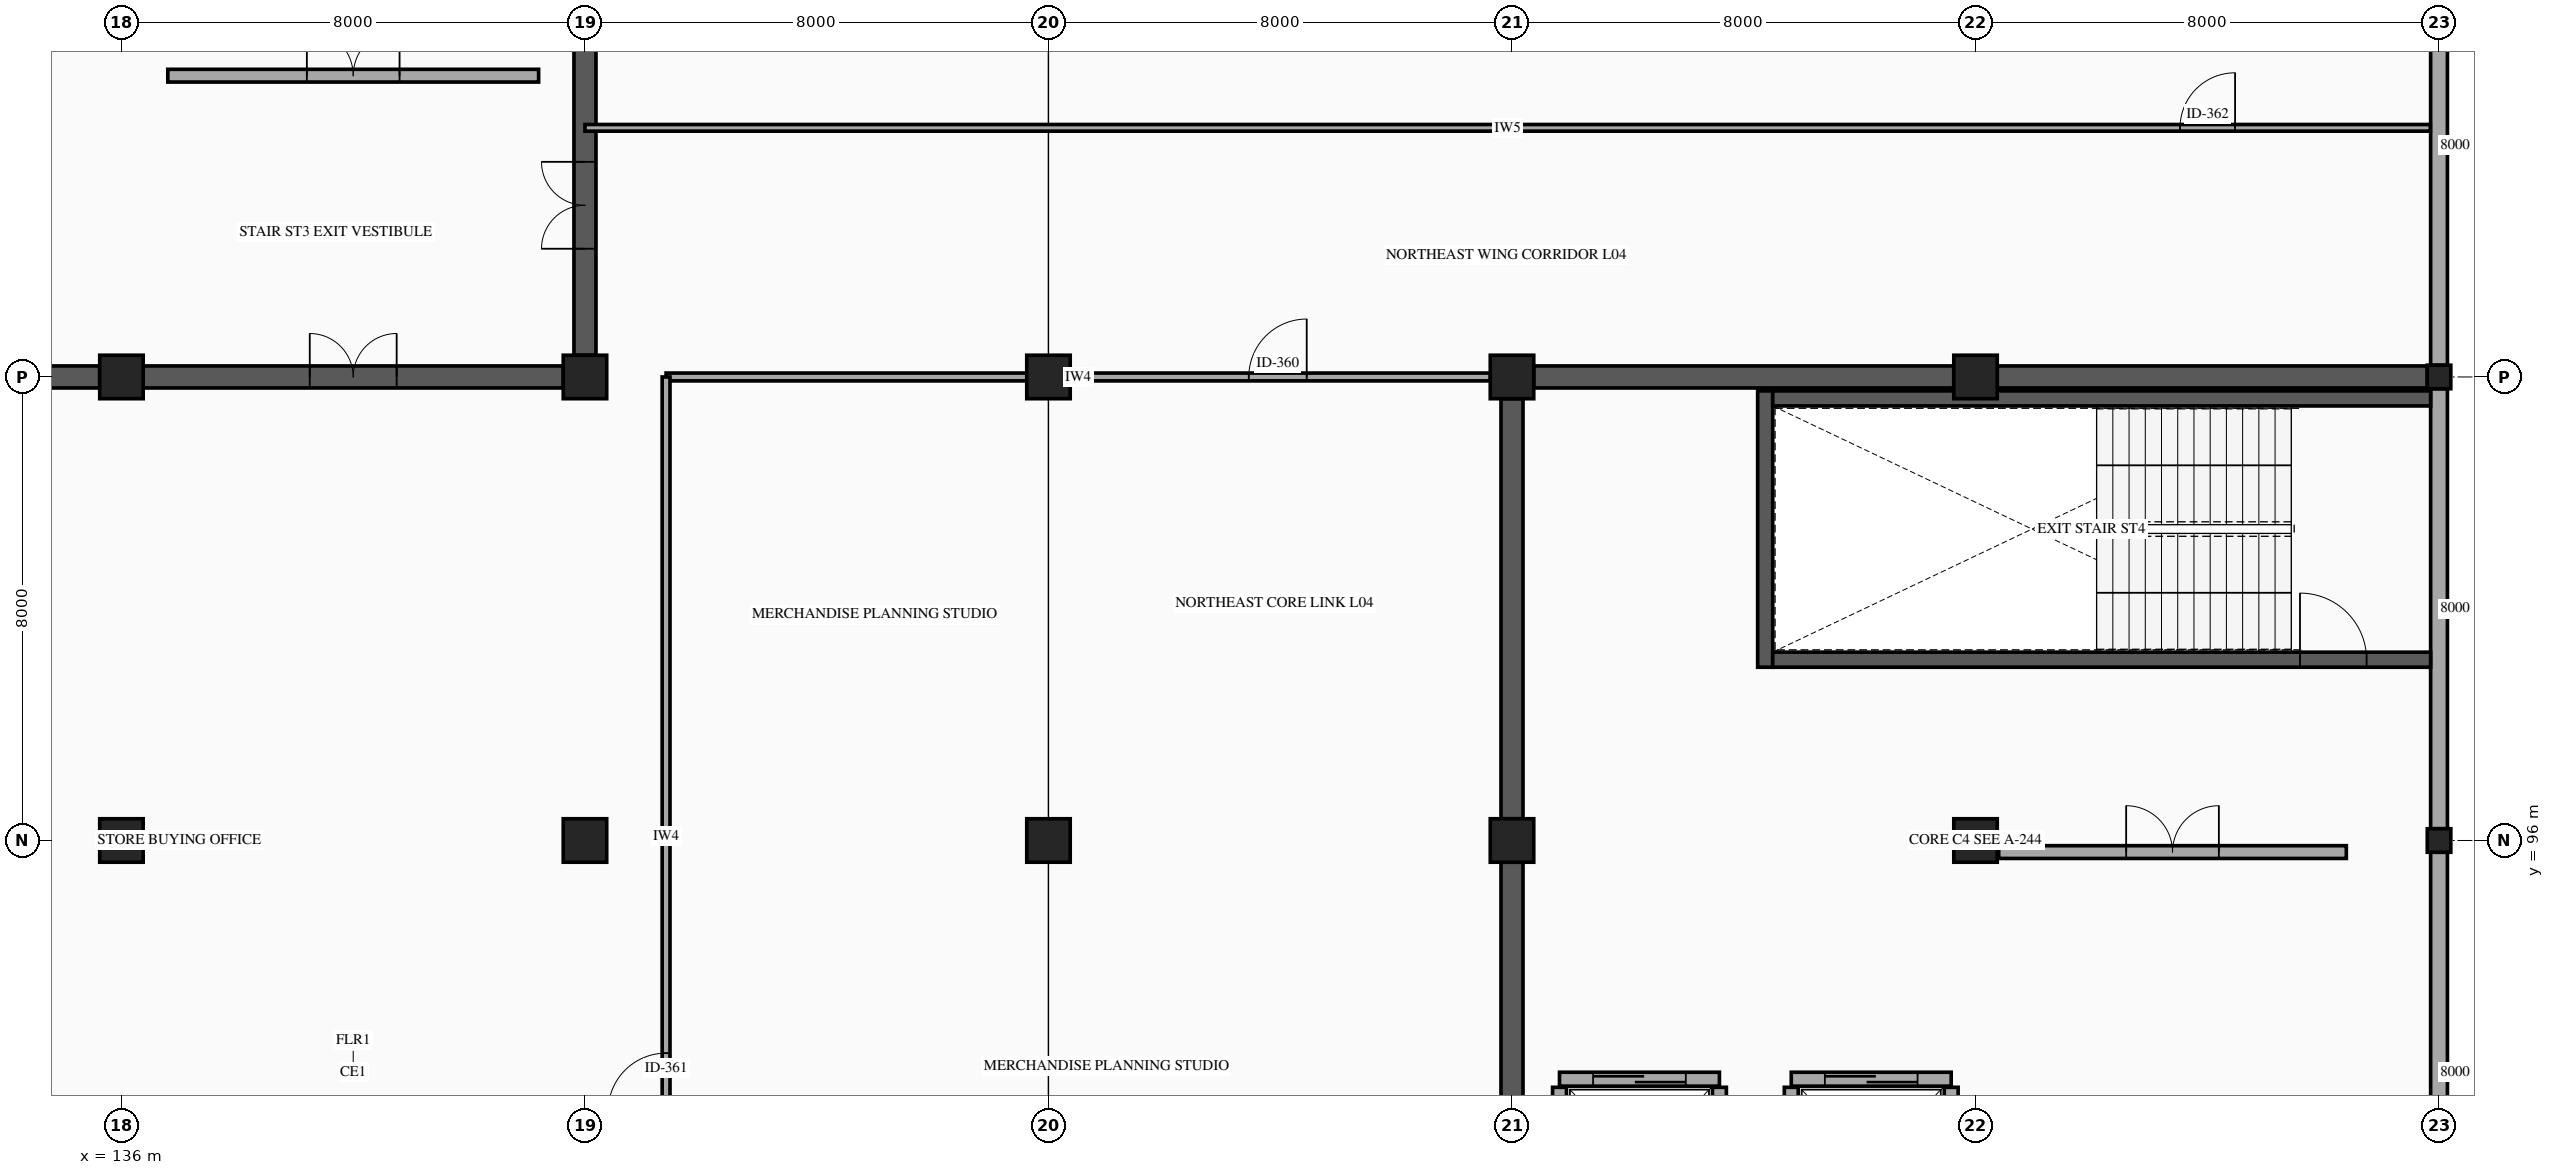
"""IFC4 building model, lengths in metres.
Left out: names, types, materials, properties, quantities, classifications, styles, units other than length and angle.
Written with IfcOpenShell. Run it as: python <this file> out.ifc"""

import sys

from ifc_helpers import new_model, si_unit, direction, frame, frame_2d, origin, origin_2d, place, context, subcontext, project, spatial, rectangle, hollow_rectangle, extrude, element, fill, save


model = new_model("IFC4")
c1 = context("Model", 3, precision=1e-05, world=origin(), true_north=direction((0.0, 1.0)))
c2 = subcontext(c1, "Body", "Model", "MODEL_VIEW")
j1 = project(units=[si_unit("LENGTHUNIT", "METRE"), si_unit("PLANEANGLEUNIT", "RADIAN")], contexts=[c1])
p1 = place(None, origin())
s1 = spatial("IfcSite", under=j1, at=p1, CompositionType="ELEMENT")
p2 = place(p1, origin())
s2 = spatial("IfcBuilding", under=s1, at=p2, CompositionType="ELEMENT")
p3 = place(p2, frame((0.0, 0.0, 19.4)))
s3 = spatial("IfcBuildingStorey", under=s2, at=p3, CompositionType="ELEMENT", Elevation=19.4)
for number, where, z_axis, x_axis in (
    (1, (136.0, 96.0, 0.0), (0.0, 0.0, 1.0), (1.0, 0.0, 0.0)),
    (2, (136.0, 104.0, 0.0), (0.0, 0.0, 1.0), (1.0, 0.0, 0.0)),
    (3, (144.0, 96.0, 0.0), (0.0, 0.0, 1.0), (1.0, 0.0, 0.0)),
    (4, (144.0, 104.0, 0.0), (0.0, 0.0, 1.0), (1.0, 0.0, 0.0)),
    (5, (152.0, 96.0, 0.0), (0.0, 0.0, 1.0), (1.0, 0.0, 0.0)),
    (6, (152.0, 104.0, 0.0), (0.0, 0.0, 1.0), (1.0, 0.0, 0.0)),
    (7, (160.0, 96.0, 0.0), (0.0, 0.0, 1.0), (1.0, 0.0, 0.0)),
    (8, (160.0, 104.0, 0.0), (0.0, 0.0, 1.0), (1.0, 0.0, 0.0)),
    (9, (168.0, 96.0, 0.0), (0.0, 0.0, 1.0), (1.0, 0.0, 0.0)),
    (10, (168.0, 104.0, 0.0), (0.0, 0.0, 1.0), (1.0, 0.0, 0.0)),
):
    element("IfcColumn", number, at=place(p3, frame(where, z_axis=z_axis, x_axis=x_axis)), inside=s3, PredefinedType="COLUMN", context=c2, shape_type="SweptSolid", body=[
        extrude(rectangle(XDim=0.75, YDim=0.75, at=origin_2d()), origin(), (0.0, 0.0, 1.0), 4.5),
    ])
for number, where, z_axis, x_axis in (
    (11, (176.0, 96.0, 0.0), (0.0, 0.0, 1.0), (1.0, 0.0, 0.0)),
    (12, (176.0, 104.0, 0.0), (0.0, 0.0, 1.0), (1.0, 0.0, 0.0)),
):
    element("IfcColumn", number, at=place(p3, frame(where, z_axis=z_axis, x_axis=x_axis)), inside=s3, PredefinedType="COLUMN", context=c2, shape_type="SweptSolid", body=[
        extrude(hollow_rectangle(XDim=0.406, YDim=0.406, WallThickness=0.015, InnerFilletRadius=0.015, OuterFilletRadius=0.029, at=origin_2d()), origin(), (0.0, 0.0, 1.0), 4.5),
    ])
for number, where, z_axis, x_axis in (
    (13, (176.0, 111.797, 0.0), (0.0, 0.0, 1.0), (0.0, -1.0, 0.0)),
    (14, (176.0, 103.797, 0.0), (0.0, 0.0, 1.0), (0.0, -1.0, 0.0)),
    (15, (176.0, 95.797, 0.0), (0.0, 0.0, 1.0), (0.0, -1.0, 0.0)),
):
    element("IfcWall", number, at=place(p3, frame(where, z_axis=z_axis, x_axis=x_axis)), inside=s3, PredefinedType="STANDARD", context=c2, shape_type="SweptSolid", body=[
        extrude(rectangle(XDim=7.594, YDim=0.29, at=frame_2d((3.797, 0.0))), origin(), (0.0, 0.0, 1.0), 3.48),
    ])
p4 = place(p3, frame((128.375, 104.0, 0.0), z_axis=(0.0, 0.0, 1.0), x_axis=(1.0, 0.0, 0.0)))
e16 = element("IfcWall", 16, at=p4, inside=s3, PredefinedType="SHEAR", context=c2, shape_type="SweptSolid", body=[
    extrude(rectangle(XDim=7.25, YDim=0.38, at=frame_2d((3.625, 0.0))), origin(), (0.0, 0.0, 1.0), 4.28),
])
p5 = place(p3, frame((136.375, 104.0, 0.0), z_axis=(0.0, 0.0, 1.0), x_axis=(1.0, 0.0, 0.0)))
e17 = element("IfcWall", 17, at=p5, inside=s3, PredefinedType="SHEAR", context=c2, shape_type="SweptSolid", body=[
    extrude(rectangle(XDim=7.25, YDim=0.38, at=frame_2d((3.625, 0.0))), origin(), (0.0, 0.0, 1.0), 4.28),
])
p6 = place(p5, frame((2.875, 0.0, 0.0)))
e18 = element("IfcOpeningElement", 18, at=p6, cuts=e17, PredefinedType="OPENING", context=c2, shape_type="SweptSolid", body=[
    extrude(rectangle(XDim=1.5, YDim=2.15, at=frame_2d((0.75, 1.075))), frame((0.0, 0.2, 0.0), z_axis=(0.0, -1.0, 0.0), x_axis=(1.0, 0.0, 0.0)), (0.0, 0.0, 1.0), 0.4),
])
p7 = place(p3, frame((144.0, 104.375, 0.0), z_axis=(0.0, 0.0, 1.0), x_axis=(0.0, 1.0, 0.0)))
e19 = element("IfcWall", 19, at=p7, inside=s3, PredefinedType="SHEAR", context=c2, shape_type="SweptSolid", body=[
    extrude(rectangle(XDim=7.25, YDim=0.38, at=frame_2d((3.625, 0.0))), origin(), (0.0, 0.0, 1.0), 4.28),
])
p8 = place(p7, frame((1.838, 0.0, 0.0)))
e20 = element("IfcOpeningElement", 20, at=p8, cuts=e19, PredefinedType="OPENING", context=c2, shape_type="SweptSolid", body=[
    extrude(rectangle(XDim=1.5, YDim=2.15, at=frame_2d((0.75, 1.075))), frame((0.0, 0.2, 0.0), z_axis=(0.0, -1.0, 0.0), x_axis=(1.0, 0.0, 0.0)), (0.0, 0.0, 1.0), 0.4),
])
p9 = place(p3, frame((136.8, 109.2, 0.0), z_axis=(0.0, 0.0, 1.0), x_axis=(1.0, 0.0, 0.0)))
e21 = element("IfcWall", 21, at=p9, inside=s3, PredefinedType="PARTITIONING", context=c2, shape_type="SweptSolid", body=[
    extrude(rectangle(XDim=6.4, YDim=0.22, at=frame_2d((3.2, 0.0))), origin(), (0.0, 0.0, 1.0), 3.48),
])
p10 = place(p9, frame((2.4, 0.0, 0.0)))
e22 = element("IfcOpeningElement", 22, at=p10, cuts=e21, PredefinedType="OPENING", context=c2, shape_type="SweptSolid", body=[
    extrude(rectangle(XDim=1.6, YDim=2.15, at=frame_2d((0.8, 1.075))), frame((0.0, 0.12, 0.0), z_axis=(0.0, -1.0, 0.0), x_axis=(1.0, 0.0, 0.0)), (0.0, 0.0, 1.0), 0.24),
])
p11 = place(p3, frame((164.37, 98.99, 0.0), z_axis=(0.0, 0.0, 1.0), x_axis=(0.0, 1.0, 0.0)))
e23 = element("IfcWall", 23, at=p11, inside=s3, PredefinedType="SHEAR", context=c2, shape_type="SweptSolid", body=[
    extrude(rectangle(XDim=4.77, YDim=0.26, at=frame_2d((2.385, 0.0))), origin(), (0.0, 0.0, 1.0), 4.28),
])
p12 = place(p3, frame((164.5, 99.12, 0.0), z_axis=(0.0, 0.0, 1.0), x_axis=(1.0, 0.0, 0.0)))
e24 = element("IfcWall", 24, at=p12, inside=s3, PredefinedType="SHEAR", context=c2, shape_type="SweptSolid", body=[
    extrude(rectangle(XDim=11.355, YDim=0.26, at=frame_2d((5.677, 0.0))), origin(), (0.0, 0.0, 1.0), 4.28),
])
p13 = place(p12, frame((9.1, 0.0, 0.0)))
e25 = element("IfcOpeningElement", 25, at=p13, cuts=e24, PredefinedType="OPENING", context=c2, shape_type="SweptSolid", body=[
    extrude(rectangle(XDim=1.15, YDim=2.15, at=frame_2d((0.575, 1.075))), frame((0.0, 0.14, 0.0), z_axis=(0.0, -1.0, 0.0), x_axis=(1.0, 0.0, 0.0)), (0.0, 0.0, 1.0), 0.28),
])
p14 = place(p3, frame((164.5, 103.63, 0.0), z_axis=(0.0, 0.0, 1.0), x_axis=(1.0, 0.0, 0.0)))
e26 = element("IfcWall", 26, at=p14, inside=s3, PredefinedType="SHEAR", context=c2, shape_type="SweptSolid", body=[
    extrude(rectangle(XDim=11.355, YDim=0.26, at=frame_2d((5.677, 0.0))), origin(), (0.0, 0.0, 1.0), 4.28),
])
p15 = place(p3, frame((160.375, 104.0, 0.0), z_axis=(0.0, 0.0, 1.0), x_axis=(1.0, 0.0, 0.0)))
e27 = element("IfcWall", 27, at=p15, inside=s3, PredefinedType="SHEAR", context=c2, shape_type="SweptSolid", body=[
    extrude(rectangle(XDim=7.25, YDim=0.38, at=frame_2d((3.625, 0.0))), origin(), (0.0, 0.0, 1.0), 4.28),
])
p16 = place(p3, frame((168.375, 104.0, 0.0), z_axis=(0.0, 0.0, 1.0), x_axis=(1.0, 0.0, 0.0)))
e28 = element("IfcWall", 28, at=p16, inside=s3, PredefinedType="SHEAR", context=c2, shape_type="SweptSolid", body=[
    extrude(rectangle(XDim=7.422, YDim=0.38, at=frame_2d((3.711, 0.0))), origin(), (0.0, 0.0, 1.0), 4.28),
])
for number, where, z_axis, x_axis in (
    (29, (160.0, 88.375, 0.0), (0.0, 0.0, 1.0), (0.0, 1.0, 0.0)),
    (30, (160.0, 96.375, 0.0), (0.0, 0.0, 1.0), (0.0, 1.0, 0.0)),
):
    element("IfcWall", number, at=place(p3, frame(where, z_axis=z_axis, x_axis=x_axis)), inside=s3, PredefinedType="SHEAR", context=c2, shape_type="SweptSolid", body=[
        extrude(rectangle(XDim=7.25, YDim=0.38, at=frame_2d((3.625, 0.0))), origin(), (0.0, 0.0, 1.0), 4.28),
    ])
p17 = place(p3, frame((164.82, 91.88, 0.0), z_axis=(0.0, 0.0, 1.0), x_axis=(1.0, 0.0, 0.0)))
e31 = element("IfcWall", 31, at=p17, inside=s3, PredefinedType="PARTITIONING", context=c2, shape_type="SweptSolid", body=[
    extrude(rectangle(XDim=2.76, YDim=0.24, at=frame_2d((1.38, 0.0))), origin(), (0.0, 0.0, 1.0), 4.28),
])
p18 = place(p17, frame((0.58, 0.0, 0.0)))
e32 = element("IfcOpeningElement", 32, at=p18, cuts=e31, PredefinedType="OPENING", context=c2, shape_type="SweptSolid", body=[
    extrude(rectangle(XDim=1.6, YDim=2.3, at=frame_2d((0.8, 1.15))), frame((0.0, 0.13, 0.0), z_axis=(0.0, -1.0, 0.0), x_axis=(1.0, 0.0, 0.0)), (0.0, 0.0, 1.0), 0.26),
])
for number, where, z_axis, x_axis in (
    (33, (164.82, 89.06, 0.0), (0.0, 0.0, 1.0), (0.0, 1.0, 0.0)),
    (34, (167.58, 89.06, 0.0), (0.0, 0.0, 1.0), (0.0, 1.0, 0.0)),
):
    element("IfcWall", number, at=place(p3, frame(where, z_axis=z_axis, x_axis=x_axis)), inside=s3, PredefinedType="PARTITIONING", context=c2, shape_type="SweptSolid", body=[
        extrude(rectangle(XDim=2.68, YDim=0.24, at=frame_2d((1.34, 0.0))), origin(), (0.0, 0.0, 1.0), 4.28),
    ])
p19 = place(p3, frame((160.82, 91.88, 0.0), z_axis=(0.0, 0.0, 1.0), x_axis=(1.0, 0.0, 0.0)))
e35 = element("IfcWall", 35, at=p19, inside=s3, PredefinedType="PARTITIONING", context=c2, shape_type="SweptSolid", body=[
    extrude(rectangle(XDim=2.76, YDim=0.24, at=frame_2d((1.38, 0.0))), origin(), (0.0, 0.0, 1.0), 4.28),
])
p20 = place(p19, frame((0.58, 0.0, 0.0)))
e36 = element("IfcOpeningElement", 36, at=p20, cuts=e35, PredefinedType="OPENING", context=c2, shape_type="SweptSolid", body=[
    extrude(rectangle(XDim=1.6, YDim=2.3, at=frame_2d((0.8, 1.15))), frame((0.0, 0.13, 0.0), z_axis=(0.0, -1.0, 0.0), x_axis=(1.0, 0.0, 0.0)), (0.0, 0.0, 1.0), 0.26),
])
for number, where, z_axis, x_axis in (
    (37, (160.82, 89.06, 0.0), (0.0, 0.0, 1.0), (0.0, 1.0, 0.0)),
    (38, (163.58, 89.06, 0.0), (0.0, 0.0, 1.0), (0.0, 1.0, 0.0)),
):
    element("IfcWall", number, at=place(p3, frame(where, z_axis=z_axis, x_axis=x_axis)), inside=s3, PredefinedType="PARTITIONING", context=c2, shape_type="SweptSolid", body=[
        extrude(rectangle(XDim=2.68, YDim=0.24, at=frame_2d((1.34, 0.0))), origin(), (0.0, 0.0, 1.0), 4.28),
    ])
p21 = place(p3, frame((168.4, 95.8, 0.0), z_axis=(0.0, 0.0, 1.0), x_axis=(1.0, 0.0, 0.0)))
e39 = element("IfcWall", 39, at=p21, inside=s3, PredefinedType="PARTITIONING", context=c2, shape_type="SweptSolid", body=[
    extrude(rectangle(XDim=6.0, YDim=0.22, at=frame_2d((3.0, 0.0))), origin(), (0.0, 0.0, 1.0), 3.48),
])
p22 = place(p21, frame((2.2, 0.0, 0.0)))
e40 = element("IfcOpeningElement", 40, at=p22, cuts=e39, PredefinedType="OPENING", context=c2, shape_type="SweptSolid", body=[
    extrude(rectangle(XDim=1.6, YDim=2.15, at=frame_2d((0.8, 1.075))), frame((0.0, 0.12, 0.0), z_axis=(0.0, -1.0, 0.0), x_axis=(1.0, 0.0, 0.0)), (0.0, 0.0, 1.0), 0.24),
])
p23 = place(p3, frame((145.4, 104.0, 0.0), z_axis=(0.0, 0.0, 1.0), x_axis=(1.0, 0.0, 0.0)))
e41 = element("IfcWall", 41, at=p23, inside=s3, PredefinedType="PARTITIONING", context=c2, shape_type="SweptSolid", body=[
    extrude(rectangle(XDim=14.225, YDim=0.135, at=frame_2d((7.113, 0.0))), origin(), (0.0, 0.0, 1.0), 3.48),
])
p24 = place(p23, frame((10.057, 0.0, 0.0)))
e42 = element("IfcOpeningElement", 42, at=p24, cuts=e41, PredefinedType="OPENING", context=c2, shape_type="SweptSolid", body=[
    extrude(rectangle(XDim=1.0, YDim=2.15, at=frame_2d((0.5, 1.075))), frame((0.0, 0.077, 0.0), z_axis=(0.0, -1.0, 0.0), x_axis=(1.0, 0.0, 0.0)), (0.0, 0.0, 1.0), 0.155),
])
p25 = place(p3, frame((145.4, 88.15, 0.0), z_axis=(0.0, 0.0, 1.0), x_axis=(0.0, 1.0, 0.0)))
e43 = element("IfcWall", 43, at=p25, inside=s3, PredefinedType="PARTITIONING", context=c2, shape_type="SweptSolid", body=[
    extrude(rectangle(XDim=15.85, YDim=0.135, at=frame_2d((7.925, 0.0))), origin(), (0.0, 0.0, 1.0), 3.48),
])
p26 = place(p25, frame((3.18, 0.0, 0.0)))
e44 = element("IfcOpeningElement", 44, at=p26, cuts=e43, PredefinedType="OPENING", context=c2, shape_type="SweptSolid", body=[
    extrude(rectangle(XDim=1.0, YDim=2.15, at=frame_2d((0.5, 1.075))), frame((0.0, 0.077, 0.0), z_axis=(0.0, -1.0, 0.0), x_axis=(1.0, 0.0, 0.0)), (0.0, 0.0, 1.0), 0.155),
])
p27 = place(p3, frame((144.0, 108.3, 0.0), z_axis=(0.0, 0.0, 1.0), x_axis=(1.0, 0.0, 0.0)))
e45 = element("IfcWall", 45, at=p27, inside=s3, PredefinedType="PARTITIONING", context=c2, shape_type="SweptSolid", body=[
    extrude(rectangle(XDim=31.85, YDim=0.115, at=frame_2d((15.925, 0.0))), origin(), (0.0, 0.0, 1.0), 3.48),
])
p28 = place(p27, frame((27.53, 0.0, 0.0)))
e46 = element("IfcOpeningElement", 46, at=p28, cuts=e45, PredefinedType="OPENING", context=c2, shape_type="SweptSolid", body=[
    extrude(rectangle(XDim=0.95, YDim=2.1, at=frame_2d((0.475, 1.05))), frame((0.0, 0.067, 0.0), z_axis=(0.0, -1.0, 0.0), x_axis=(1.0, 0.0, 0.0)), (0.0, 0.0, 1.0), 0.135),
])
p29 = place(p6, origin())
e47 = element("IfcDoor", 47, at=p29, inside=s3, OperationType="DOUBLE_DOOR_SINGLE_SWING", PredefinedType="DOOR", context=c2, shape_type="SweptSolid", body=[
    extrude(rectangle(XDim=1.5, YDim=2.15, at=frame_2d((0.75, 1.075))), frame((0.0, 0.025, 0.0), z_axis=(0.0, -1.0, 0.0), x_axis=(1.0, 0.0, 0.0)), (0.0, 0.0, 1.0), 0.05),
])
fill(e18, e47)
p30 = place(p8, origin())
e48 = element("IfcDoor", 48, at=p30, inside=s3, OperationType="DOUBLE_DOOR_SINGLE_SWING", PredefinedType="DOOR", context=c2, shape_type="SweptSolid", body=[
    extrude(rectangle(XDim=1.5, YDim=2.15, at=frame_2d((0.75, 1.075))), frame((0.0, 0.025, 0.0), z_axis=(0.0, -1.0, 0.0), x_axis=(1.0, 0.0, 0.0)), (0.0, 0.0, 1.0), 0.05),
])
fill(e20, e48)
p31 = place(p10, origin())
e49 = element("IfcDoor", 49, at=p31, inside=s3, OperationType="DOUBLE_DOOR_SINGLE_SWING", PredefinedType="DOOR", context=c2, shape_type="SweptSolid", body=[
    extrude(rectangle(XDim=1.6, YDim=2.15, at=frame_2d((0.8, 1.075))), frame((0.0, 0.025, 0.0), z_axis=(0.0, -1.0, 0.0), x_axis=(1.0, 0.0, 0.0)), (0.0, 0.0, 1.0), 0.05),
])
fill(e22, e49)
p32 = place(p13, origin())
e50 = element("IfcDoor", 50, at=p32, inside=s3, OperationType="SINGLE_SWING_LEFT", PredefinedType="DOOR", context=c2, shape_type="SweptSolid", body=[
    extrude(rectangle(XDim=1.15, YDim=2.15, at=frame_2d((0.575, 1.075))), frame((0.0, 0.025, 0.0), z_axis=(0.0, -1.0, 0.0), x_axis=(1.0, 0.0, 0.0)), (0.0, 0.0, 1.0), 0.05),
])
fill(e25, e50)
p33 = place(p18, origin())
e51 = element("IfcDoor", 51, at=p33, inside=s3, OperationType="SLIDING_TO_LEFT", PredefinedType="DOOR", context=c2, shape_type="SweptSolid", body=[
    extrude(rectangle(XDim=1.6, YDim=2.3, at=frame_2d((0.8, 1.15))), frame((0.0, 0.025, 0.0), z_axis=(0.0, -1.0, 0.0), x_axis=(1.0, 0.0, 0.0)), (0.0, 0.0, 1.0), 0.05),
])
fill(e32, e51)
p34 = place(p20, origin())
e52 = element("IfcDoor", 52, at=p34, inside=s3, OperationType="SLIDING_TO_LEFT", PredefinedType="DOOR", context=c2, shape_type="SweptSolid", body=[
    extrude(rectangle(XDim=1.6, YDim=2.3, at=frame_2d((0.8, 1.15))), frame((0.0, 0.025, 0.0), z_axis=(0.0, -1.0, 0.0), x_axis=(1.0, 0.0, 0.0)), (0.0, 0.0, 1.0), 0.05),
])
fill(e36, e52)
p35 = place(p22, origin())
e53 = element("IfcDoor", 53, at=p35, inside=s3, OperationType="DOUBLE_DOOR_SINGLE_SWING", PredefinedType="DOOR", context=c2, shape_type="SweptSolid", body=[
    extrude(rectangle(XDim=1.6, YDim=2.15, at=frame_2d((0.8, 1.075))), frame((0.0, 0.025, 0.0), z_axis=(0.0, -1.0, 0.0), x_axis=(1.0, 0.0, 0.0)), (0.0, 0.0, 1.0), 0.05),
])
fill(e40, e53)
p36 = place(p24, origin())
e54 = element("IfcDoor", 54, at=p36, inside=s3, OperationType="SINGLE_SWING_RIGHT", PredefinedType="DOOR", context=c2, shape_type="SweptSolid", body=[
    extrude(rectangle(XDim=1.0, YDim=2.15, at=frame_2d((0.5, 1.075))), frame((0.0, 0.025, 0.0), z_axis=(0.0, -1.0, 0.0), x_axis=(1.0, 0.0, 0.0)), (0.0, 0.0, 1.0), 0.05),
])
fill(e42, e54)
p37 = place(p26, origin())
e55 = element("IfcDoor", 55, at=p37, inside=s3, OperationType="SINGLE_SWING_LEFT", PredefinedType="DOOR", context=c2, shape_type="SweptSolid", body=[
    extrude(rectangle(XDim=1.0, YDim=2.15, at=frame_2d((0.5, 1.075))), frame((0.0, 0.025, 0.0), z_axis=(0.0, -1.0, 0.0), x_axis=(1.0, 0.0, 0.0)), (0.0, 0.0, 1.0), 0.05),
])
fill(e44, e55)
p38 = place(p28, origin())
e56 = element("IfcDoor", 56, at=p38, inside=s3, OperationType="SINGLE_SWING_RIGHT", PredefinedType="DOOR", context=c2, shape_type="SweptSolid", body=[
    extrude(rectangle(XDim=0.95, YDim=2.1, at=frame_2d((0.475, 1.05))), frame((0.0, 0.025, 0.0), z_axis=(0.0, -1.0, 0.0), x_axis=(1.0, 0.0, 0.0)), (0.0, 0.0, 1.0), 0.05),
])
fill(e46, e56)
save(model, sys.argv[1])
